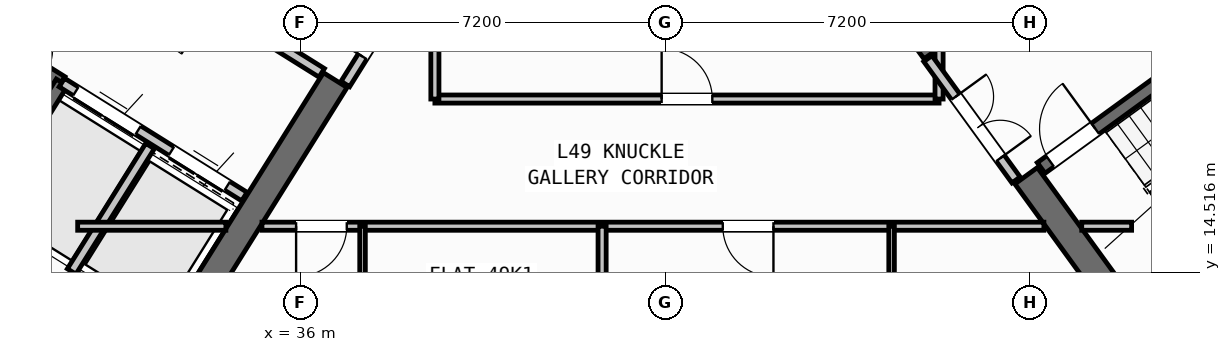
"""IFC4 building model, lengths in metres.
Left out: names, types, materials, properties, quantities, classifications, styles, units other than length and angle.
Written with IfcOpenShell. Run it as: python <this file> out.ifc"""

import sys

from ifc_helpers import new_model, si_unit, direction, frame, frame_2d, origin, place, context, subcontext, project, spatial, rectangle, extrude, source, transform, mapped, element, fill, save


model = new_model("IFC4")
c1 = context("Model", 3, precision=1e-05, world=origin(), true_north=direction((0.0, 1.0)))
c2 = subcontext(c1, "Body", "Model", "MODEL_VIEW")
j1 = project(units=[si_unit("LENGTHUNIT", "METRE"), si_unit("PLANEANGLEUNIT", "RADIAN")], contexts=[c1])
p1 = place(None, origin())
s1 = spatial("IfcSite", under=j1, at=p1, CompositionType="ELEMENT")
p2 = place(p1, origin())
s2 = spatial("IfcBuilding", under=s1, at=p2, CompositionType="ELEMENT")
p3 = place(p2, frame((0.0, 0.0, 195.0)))
s3 = spatial("IfcBuildingStorey", under=s2, at=p3, CompositionType="ELEMENT", Elevation=195.0)
p4 = place(p3, frame((33.366, 12.477, 0.0), z_axis=(0.0, 0.0, 1.0), x_axis=(-0.848047359947, 0.529920442413, 0.0)))
e1 = element("IfcWall", 1, at=p4, inside=s3, PredefinedType="SHEAR", context=c2, shape_type="SweptSolid", body=[
    extrude(rectangle(XDim=13.14, YDim=0.55, at=frame_2d((6.57, 0.0))), origin(), (0.0, 0.0, 1.0), 4.22),
])
p5 = place(p3, frame((36.683, 18.304, 0.0), z_axis=(0.0, 0.0, 1.0), x_axis=(-0.529896466841, -0.848062341122, 0.0)))
e2 = element("IfcWall", 2, at=p5, inside=s3, PredefinedType="SHEAR", context=c2, shape_type="SweptSolid", body=[
    extrude(rectangle(XDim=6.425, YDim=0.55, at=frame_2d((3.212, 0.0))), origin(), (0.0, 0.0, 1.0), 4.22),
])
p6 = place(p3, frame((52.359, 13.14, 0.0), z_axis=(0.0, 0.0, 1.0), x_axis=(0.809014896919, 0.587788139183, 0.0)))
e3 = element("IfcWall", 3, at=p6, inside=s3, PredefinedType="SHEAR", context=c2, shape_type="SweptSolid", body=[
    extrude(rectangle(XDim=12.34, YDim=0.55, at=frame_2d((6.17, 0.0))), origin(), (0.0, 0.0, 1.0), 4.22),
])
p7 = place(p3, frame((52.42, 13.524, 0.0), z_axis=(0.0, 0.0, 1.0), x_axis=(-0.587802113096, 0.809004744015, 0.0)))
e4 = element("IfcWall", 4, at=p7, inside=s3, PredefinedType="SHEAR", context=c2, shape_type="SweptSolid", body=[
    extrude(rectangle(XDim=3.575, YDim=0.55, at=frame_2d((1.788, 0.0))), origin(), (0.0, 0.0, 1.0), 4.22),
])
p8 = place(p3, frame((48.526, 18.884, 0.0), z_axis=(0.0, 0.0, 1.0), x_axis=(-0.587764933797, 0.809031756236, 0.0)))
e5 = element("IfcWall", 5, at=p8, inside=s3, PredefinedType="SHEAR", context=c2, shape_type="SweptSolid", body=[
    extrude(rectangle(XDim=6.425, YDim=0.55, at=frame_2d((3.212, 0.0))), origin(), (0.0, 0.0, 1.0), 4.22),
])
p9 = place(p3, frame((31.76, 12.183, 0.0), z_axis=(0.0, 0.0, 1.0), x_axis=(-0.848047074256, 0.529920899612, 0.0)))
e6 = element("IfcWall", 6, at=p9, inside=s3, PredefinedType="STANDARD", context=c2, shape_type="SweptSolid", body=[
    extrude(rectangle(XDim=30.652, YDim=0.32, at=frame_2d((15.326, 0.0))), origin(), (0.0, 0.0, 1.0), 4.22),
])
p10 = place(p9, frame((15.166, 0.0, 0.0)))
e7 = element("IfcOpeningElement", 7, at=p10, cuts=e6, PredefinedType="OPENING", context=c2, shape_type="SweptSolid", body=[
    extrude(rectangle(XDim=1.2, YDim=2.15, at=frame_2d((0.6, 1.075))), frame((0.0, 0.17, 0.0), z_axis=(0.0, -1.0, 0.0), x_axis=(1.0, 0.0, 0.0)), (0.0, 0.0, 1.0), 0.34),
])
p11 = place(p9, frame((1.765, 0.0, 0.7)))
e8 = element("IfcOpeningElement", 8, at=p11, cuts=e6, PredefinedType="OPENING", context=c2, shape_type="SweptSolid", body=[
    extrude(rectangle(XDim=2.6, YDim=2.0, at=frame_2d((1.3, 1.0))), frame((0.0, 0.17, 0.0), z_axis=(0.0, -1.0, 0.0), x_axis=(1.0, 0.0, 0.0)), (0.0, 0.0, 1.0), 0.34),
])
p12 = place(p9, frame((6.994, 0.0, 0.7)))
e9 = element("IfcOpeningElement", 9, at=p12, cuts=e6, PredefinedType="OPENING", context=c2, shape_type="SweptSolid", body=[
    extrude(rectangle(XDim=2.6, YDim=2.0, at=frame_2d((1.3, 1.0))), frame((0.0, 0.17, 0.0), z_axis=(0.0, -1.0, 0.0), x_axis=(1.0, 0.0, 0.0)), (0.0, 0.0, 1.0), 0.34),
])
p13 = place(p9, frame((19.101, 0.0, 0.85)))
e10 = element("IfcOpeningElement", 10, at=p13, cuts=e6, PredefinedType="OPENING", context=c2, shape_type="SweptSolid", body=[
    extrude(rectangle(XDim=1.6, YDim=1.8, at=frame_2d((0.8, 0.9))), frame((0.0, 0.17, 0.0), z_axis=(0.0, -1.0, 0.0), x_axis=(1.0, 0.0, 0.0)), (0.0, 0.0, 1.0), 0.34),
])
p14 = place(p9, frame((26.358, 0.0, 0.7)))
e11 = element("IfcOpeningElement", 11, at=p14, cuts=e6, PredefinedType="OPENING", context=c2, shape_type="SweptSolid", body=[
    extrude(rectangle(XDim=2.6, YDim=2.0, at=frame_2d((1.3, 1.0))), frame((0.0, 0.17, 0.0), z_axis=(0.0, -1.0, 0.0), x_axis=(1.0, 0.0, 0.0)), (0.0, 0.0, 1.0), 0.34),
])
p15 = place(p3, frame((31.28, 18.261, 0.0), z_axis=(0.0, 0.0, 1.0), x_axis=(-0.848051618787, 0.529913626805, 0.0)))
e12 = element("IfcWall", 12, at=p15, inside=s3, PredefinedType="SHEAR", context=c2, shape_type="SweptSolid", body=[
    extrude(rectangle(XDim=7.46, YDim=0.26, at=frame_2d((3.73, 0.0))), origin(), (0.0, 0.0, 1.0), 4.22),
])
p16 = place(p15, frame((0.36, 0.0, 0.0)))
e13 = element("IfcOpeningElement", 13, at=p16, cuts=e12, PredefinedType="OPENING", context=c2, shape_type="SweptSolid", body=[
    extrude(rectangle(XDim=0.86, YDim=2.05, at=frame_2d((0.43, 1.025))), frame((0.0, 0.14, 0.0), z_axis=(0.0, -1.0, 0.0), x_axis=(1.0, 0.0, 0.0)), (0.0, 0.0, 1.0), 0.28),
])
p17 = place(p3, frame((31.288, 18.256, 0.0), z_axis=(0.0, 0.0, 1.0), x_axis=(-0.529943379326, -0.848033026897, 0.0)))
e14 = element("IfcWall", 14, at=p17, inside=s3, PredefinedType="SHEAR", context=c2, shape_type="SweptSolid", body=[
    extrude(rectangle(XDim=3.16, YDim=0.26, at=frame_2d((1.58, 0.0))), origin(), (0.0, 0.0, 1.0), 4.22),
])
p18 = place(p3, frame((34.891, 16.005, 0.0), z_axis=(0.0, 0.0, 1.0), x_axis=(-0.848062873452, 0.529895614884, 0.0)))
e15 = element("IfcWall", 15, at=p18, inside=s3, PredefinedType="STANDARD", context=c2, shape_type="SweptSolid", body=[
    extrude(rectangle(XDim=4.248, YDim=0.2, at=frame_2d((2.124, 0.0))), origin(), (0.0, 0.0, 1.0), 4.21),
])
p19 = place(p18, frame((0.398, 0.0, 0.0)))
e16 = element("IfcOpeningElement", 16, at=p19, cuts=e15, PredefinedType="OPENING", context=c2, shape_type="SweptSolid", body=[
    extrude(rectangle(XDim=1.3, YDim=2.2, at=frame_2d((0.65, 1.1))), frame((0.0, 0.11, 0.0), z_axis=(0.0, -1.0, 0.0), x_axis=(1.0, 0.0, 0.0)), (0.0, 0.0, 1.0), 0.22),
])
p20 = place(p18, frame((2.473, 0.0, 0.0)))
e17 = element("IfcOpeningElement", 17, at=p20, cuts=e15, PredefinedType="OPENING", context=c2, shape_type="SweptSolid", body=[
    extrude(rectangle(XDim=1.45, YDim=2.25, at=frame_2d((0.725, 1.125))), frame((0.0, 0.11, 0.0), z_axis=(0.0, -1.0, 0.0), x_axis=(1.0, 0.0, 0.0)), (0.0, 0.0, 1.0), 0.22),
])
p21 = place(p3, frame((36.417, 18.447, 0.0), z_axis=(0.0, 0.0, 1.0), x_axis=(-0.848064879198, 0.529892404805, 0.0)))
e18 = element("IfcWall", 18, at=p21, inside=s3, PredefinedType="STANDARD", context=c2, shape_type="SweptSolid", body=[
    extrude(rectangle(XDim=5.768, YDim=0.2, at=frame_2d((2.884, 0.0))), origin(), (0.0, 0.0, 1.0), 4.21),
])
p22 = place(p21, frame((2.548, 0.0, 0.0)))
e19 = element("IfcOpeningElement", 19, at=p22, cuts=e18, PredefinedType="OPENING", context=c2, shape_type="SweptSolid", body=[
    extrude(rectangle(XDim=1.15, YDim=2.1, at=frame_2d((0.575, 1.05))), frame((0.0, 0.11, 0.0), z_axis=(0.0, -1.0, 0.0), x_axis=(1.0, 0.0, 0.0)), (0.0, 0.0, 1.0), 0.22),
])
p23 = place(p3, frame((33.029, 17.003, 0.0), z_axis=(0.0, 0.0, 1.0), x_axis=(-0.529916267533, -0.848049968695, 0.0)))
e20 = element("IfcWall", 20, at=p23, inside=s3, PredefinedType="STANDARD", context=c2, shape_type="SweptSolid", body=[
    extrude(rectangle(XDim=2.92, YDim=0.2, at=frame_2d((1.46, 0.0))), origin(), (0.0, 0.0, 1.0), 4.21),
])
p24 = place(p3, frame((52.472, 14.013, 0.0), z_axis=(0.0, 0.0, 1.0), x_axis=(0.809028366311, 0.587769599847, 0.0)))
e21 = element("IfcWall", 21, at=p24, inside=s3, PredefinedType="SHEAR", context=c2, shape_type="SweptSolid", body=[
    extrude(rectangle(XDim=7.33, YDim=0.26, at=frame_2d((3.665, 0.0))), origin(), (0.0, 0.0, 1.0), 4.22),
])
p25 = place(p3, frame((50.615, 16.57, 0.0), z_axis=(0.0, 0.0, 1.0), x_axis=(0.809028366311, 0.587769599847, 0.0)))
e22 = element("IfcWall", 22, at=p25, inside=s3, PredefinedType="SHEAR", context=c2, shape_type="SweptSolid", body=[
    extrude(rectangle(XDim=7.33, YDim=0.26, at=frame_2d((3.665, 0.0))), origin(), (0.0, 0.0, 1.0), 4.22),
])
p26 = place(p25, frame((0.22, 0.0, 0.0)))
e23 = element("IfcOpeningElement", 23, at=p26, cuts=e22, PredefinedType="OPENING", context=c2, shape_type="SweptSolid", body=[
    extrude(rectangle(XDim=1.1, YDim=2.1, at=frame_2d((0.55, 1.05))), frame((0.0, 0.14, 0.0), z_axis=(0.0, -1.0, 0.0), x_axis=(1.0, 0.0, 0.0)), (0.0, 0.0, 1.0), 0.28),
])
p27 = place(p3, frame((38.451, 20.737, 0.0), z_axis=(0.0, 0.0, 1.0), x_axis=(-0.529924799939, -0.848044637038, 0.0)))
e24 = element("IfcWall", 24, at=p27, inside=s3, PredefinedType="STANDARD", context=c2, shape_type="SweptSolid", body=[
    extrude(rectangle(XDim=2.96, YDim=0.2, at=frame_2d((1.48, 0.0))), origin(), (0.0, 0.0, 1.0), 4.21),
])
p28 = place(p27, frame((1.46, 0.0, 0.0)))
e25 = element("IfcOpeningElement", 25, at=p28, cuts=e24, PredefinedType="OPENING", context=c2, shape_type="SweptSolid", body=[
    extrude(rectangle(XDim=0.86, YDim=2.05, at=frame_2d((0.43, 1.025))), frame((0.0, 0.11, 0.0), z_axis=(0.0, -1.0, 0.0), x_axis=(1.0, 0.0, 0.0)), (0.0, 0.0, 1.0), 0.22),
])
p29 = place(p3, frame((31.6, 15.42, 0.0), z_axis=(0.0, 0.0, 1.0), x_axis=(1.0, 0.0, 0.0)))
e26 = element("IfcWall", 26, at=p29, inside=s3, PredefinedType="PARTITIONING", context=c2, shape_type="SweptSolid", body=[
    extrude(rectangle(XDim=2.925, YDim=0.16, at=frame_2d((1.462, 0.0))), origin(), (0.0, 0.0, 1.0), 4.21),
])
p30 = place(p3, frame((35.237, 15.42, 0.0), z_axis=(0.0, 0.0, 1.0), x_axis=(1.0, 0.0, 0.0)))
e27 = element("IfcWall", 27, at=p30, inside=s3, PredefinedType="PARTITIONING", context=c2, shape_type="SweptSolid", body=[
    extrude(rectangle(XDim=15.432, YDim=0.16, at=frame_2d((7.716, 0.0))), origin(), (0.0, 0.0, 1.0), 4.21),
])
p31 = place(p30, frame((0.674, 0.0, 0.0)))
e28 = element("IfcOpeningElement", 28, at=p31, cuts=e27, PredefinedType="OPENING", context=c2, shape_type="SweptSolid", body=[
    extrude(rectangle(XDim=1.0, YDim=2.1, at=frame_2d((0.5, 1.05))), frame((0.0, 0.09, 0.0), z_axis=(0.0, -1.0, 0.0), x_axis=(1.0, 0.0, 0.0)), (0.0, 0.0, 1.0), 0.18),
])
p32 = place(p30, frame((9.094, 0.0, 0.0)))
e29 = element("IfcOpeningElement", 29, at=p32, cuts=e27, PredefinedType="OPENING", context=c2, shape_type="SweptSolid", body=[
    extrude(rectangle(XDim=1.0, YDim=2.1, at=frame_2d((0.5, 1.05))), frame((0.0, 0.09, 0.0), z_axis=(0.0, -1.0, 0.0), x_axis=(1.0, 0.0, 0.0)), (0.0, 0.0, 1.0), 0.18),
])
p33 = place(p3, frame((51.416, 15.42, 0.0), z_axis=(0.0, 0.0, 1.0), x_axis=(1.0, 0.0, 0.0)))
e30 = element("IfcWall", 30, at=p33, inside=s3, PredefinedType="PARTITIONING", context=c2, shape_type="SweptSolid", body=[
    extrude(rectangle(XDim=0.984, YDim=0.16, at=frame_2d((0.492, 0.0))), origin(), (0.0, 0.0, 1.0), 4.21),
])
p34 = place(p3, frame((38.65, 17.93, 0.0), z_axis=(0.0, 0.0, 1.0), x_axis=(1.0, 0.0, 0.0)))
e31 = element("IfcWall", 31, at=p34, inside=s3, PredefinedType="PARTITIONING", context=c2, shape_type="SweptSolid", body=[
    extrude(rectangle(XDim=9.95, YDim=0.16, at=frame_2d((4.975, 0.0))), origin(), (0.0, 0.0, 1.0), 4.21),
])
p35 = place(p34, frame((4.475, 0.0, 0.0)))
e32 = element("IfcOpeningElement", 32, at=p35, cuts=e31, PredefinedType="OPENING", context=c2, shape_type="SweptSolid", body=[
    extrude(rectangle(XDim=1.0, YDim=2.1, at=frame_2d((0.5, 1.05))), frame((0.0, 0.09, 0.0), z_axis=(0.0, -1.0, 0.0), x_axis=(1.0, 0.0, 0.0)), (0.0, 0.0, 1.0), 0.18),
])
p36 = place(p3, frame((38.65, 17.93, 0.0), z_axis=(0.0, 0.0, 1.0), x_axis=(0.0, 1.0, 0.0)))
e33 = element("IfcWall", 33, at=p36, inside=s3, PredefinedType="PARTITIONING", context=c2, shape_type="SweptSolid", body=[
    extrude(rectangle(XDim=2.951, YDim=0.16, at=frame_2d((1.476, 0.0))), origin(), (0.0, 0.0, 1.0), 4.21),
])
p37 = place(p3, frame((48.6, 17.93, 0.0), z_axis=(0.0, 0.0, 1.0), x_axis=(0.0, 1.0, 0.0)))
e34 = element("IfcWall", 34, at=p37, inside=s3, PredefinedType="PARTITIONING", context=c2, shape_type="SweptSolid", body=[
    extrude(rectangle(XDim=0.993, YDim=0.16, at=frame_2d((0.496, 0.0))), origin(), (0.0, 0.0, 1.0), 4.21),
])
p38 = place(p3, frame((50.119, 16.333, 0.0), z_axis=(0.0, 0.0, 1.0), x_axis=(-0.587749856981, 0.809042709391, 0.0)))
e35 = element("IfcWall", 35, at=p38, inside=s3, PredefinedType="STANDARD", context=c2, shape_type="SweptSolid", body=[
    extrude(rectangle(XDim=2.96, YDim=0.2, at=frame_2d((1.48, 0.0))), origin(), (0.0, 0.0, 1.0), 4.21),
])
p39 = place(p38, frame((0.53, 0.0, 0.0)))
e36 = element("IfcOpeningElement", 36, at=p39, cuts=e35, PredefinedType="OPENING", context=c2, shape_type="SweptSolid", body=[
    extrude(rectangle(XDim=1.5, YDim=2.15, at=frame_2d((0.75, 1.075))), frame((0.0, 0.11, 0.0), z_axis=(0.0, -1.0, 0.0), x_axis=(1.0, 0.0, 0.0)), (0.0, 0.0, 1.0), 0.22),
])
p40 = place(p3, frame((41.95, 1.96, 0.0), z_axis=(0.0, 0.0, 1.0), x_axis=(0.0, 1.0, 0.0)))
e37 = element("IfcWall", 37, at=p40, inside=s3, PredefinedType="PARTITIONING", context=c2, shape_type="SweptSolid", body=[
    extrude(rectangle(XDim=13.46, YDim=0.16, at=frame_2d((6.73, 0.0))), origin(), (0.0, 0.0, 1.0), 4.21),
])
p41 = place(p3, frame((37.222, 1.96, 0.0), z_axis=(0.0, 0.0, 1.0), x_axis=(0.0, 1.0, 0.0)))
e38 = element("IfcWall", 38, at=p41, inside=s3, PredefinedType="PARTITIONING", context=c2, shape_type="SweptSolid", body=[
    extrude(rectangle(XDim=13.46, YDim=0.11, at=frame_2d((6.73, 0.0))), origin(), (0.0, 0.0, 1.0), 4.21),
])
p42 = place(p41, frame((5.2, 0.0, 0.0)))
e39 = element("IfcOpeningElement", 39, at=p42, cuts=e38, PredefinedType="OPENING", context=c2, shape_type="SweptSolid", body=[
    extrude(rectangle(XDim=0.92, YDim=2.08, at=frame_2d((0.46, 1.04))), frame((0.0, 0.065, 0.0), z_axis=(0.0, -1.0, 0.0), x_axis=(1.0, 0.0, 0.0)), (0.0, 0.0, 1.0), 0.13),
])
p43 = place(p41, frame((10.67, 0.0, 0.0)))
e40 = element("IfcOpeningElement", 40, at=p43, cuts=e38, PredefinedType="OPENING", context=c2, shape_type="SweptSolid", body=[
    extrude(rectangle(XDim=0.88, YDim=2.08, at=frame_2d((0.44, 1.04))), frame((0.0, 0.065, 0.0), z_axis=(0.0, -1.0, 0.0), x_axis=(1.0, 0.0, 0.0)), (0.0, 0.0, 1.0), 0.13),
])
p44 = place(p3, frame((47.663, 1.96, 0.0), z_axis=(0.0, 0.0, 1.0), x_axis=(0.0, 1.0, 0.0)))
e41 = element("IfcWall", 41, at=p44, inside=s3, PredefinedType="PARTITIONING", context=c2, shape_type="SweptSolid", body=[
    extrude(rectangle(XDim=13.46, YDim=0.11, at=frame_2d((6.73, 0.0))), origin(), (0.0, 0.0, 1.0), 4.21),
])
p45 = place(p44, frame((6.3, 0.0, 0.0)))
e42 = element("IfcOpeningElement", 42, at=p45, cuts=e41, PredefinedType="OPENING", context=c2, shape_type="SweptSolid", body=[
    extrude(rectangle(XDim=0.92, YDim=2.08, at=frame_2d((0.46, 1.04))), frame((0.0, 0.065, 0.0), z_axis=(0.0, -1.0, 0.0), x_axis=(1.0, 0.0, 0.0)), (0.0, 0.0, 1.0), 0.13),
])
p46 = place(p44, frame((11.32, 0.0, 0.0)))
e43 = element("IfcOpeningElement", 43, at=p46, cuts=e41, PredefinedType="OPENING", context=c2, shape_type="SweptSolid", body=[
    extrude(rectangle(XDim=0.88, YDim=2.08, at=frame_2d((0.44, 1.04))), frame((0.0, 0.065, 0.0), z_axis=(0.0, -1.0, 0.0), x_axis=(1.0, 0.0, 0.0)), (0.0, 0.0, 1.0), 0.13),
])
m1 = source(origin(), c2, "Body", "SweptSolid", [
    extrude(rectangle(XDim=1.3, YDim=2.2, at=frame_2d((0.65, 1.1))), frame((0.0, 0.025, 0.0), z_axis=(0.0, -1.0, 0.0), x_axis=(1.0, 0.0, 0.0)), (0.0, 0.0, 1.0), 0.05),
])
p47 = place(p19, origin())
e44 = element("IfcDoor", 44, at=p47, inside=s3, OperationType="DOUBLE_DOOR_SLIDING", PredefinedType="DOOR", context=c2, shape_type="MappedRepresentation", body=[
    mapped(m1, transform((0.0, 0.0, 0.0), scale=1.0)),
])
fill(e16, e44)
m2 = source(origin(), c2, "Body", "SweptSolid", [
    extrude(rectangle(XDim=1.45, YDim=2.25, at=frame_2d((0.725, 1.125))), frame((0.0, 0.025, 0.0), z_axis=(0.0, -1.0, 0.0), x_axis=(1.0, 0.0, 0.0)), (0.0, 0.0, 1.0), 0.05),
])
p48 = place(p20, origin())
e45 = element("IfcDoor", 45, at=p48, inside=s3, OperationType="DOUBLE_DOOR_SLIDING", PredefinedType="DOOR", context=c2, shape_type="MappedRepresentation", body=[
    mapped(m2, transform((0.0, 0.0, 0.0), scale=1.0)),
])
fill(e17, e45)
m3 = source(origin(), c2, "Body", "SweptSolid", [
    extrude(rectangle(XDim=1.1, YDim=2.1, at=frame_2d((0.55, 1.05))), frame((0.0, 0.025, 0.0), z_axis=(0.0, -1.0, 0.0), x_axis=(1.0, 0.0, 0.0)), (0.0, 0.0, 1.0), 0.05),
])
p49 = place(p26, origin())
e46 = element("IfcDoor", 46, at=p49, inside=s3, OperationType="SINGLE_SWING_RIGHT", PredefinedType="DOOR", context=c2, shape_type="MappedRepresentation", body=[
    mapped(m3, transform((0.0, 0.0, 0.0), scale=1.0)),
])
fill(e23, e46)
m4 = source(origin(), c2, "Body", "SweptSolid", [
    extrude(rectangle(XDim=1.0, YDim=2.1, at=frame_2d((0.5, 1.05))), frame((0.0, 0.025, 0.0), z_axis=(0.0, -1.0, 0.0), x_axis=(1.0, 0.0, 0.0)), (0.0, 0.0, 1.0), 0.05),
])
p50 = place(p35, origin())
e47 = element("IfcDoor", 47, at=p50, inside=s3, OperationType="SINGLE_SWING_LEFT", PredefinedType="DOOR", context=c2, shape_type="MappedRepresentation", body=[
    mapped(m4, transform((0.0, 0.0, 0.0), scale=1.0)),
])
fill(e32, e47)
m5 = source(origin(), c2, "Body", "SweptSolid", [
    extrude(rectangle(XDim=0.86, YDim=2.05, at=frame_2d((0.43, 1.025))), frame((0.0, 0.025, 0.0), z_axis=(0.0, -1.0, 0.0), x_axis=(1.0, 0.0, 0.0)), (0.0, 0.0, 1.0), 0.05),
])
p51 = place(p28, frame((0.86, 0.0, 0.0), z_axis=(0.0, 0.0, 1.0), x_axis=(-1.0, 0.0, 0.0)))
e48 = element("IfcDoor", 48, at=p51, inside=s3, OperationType="SINGLE_SWING_LEFT", PredefinedType="DOOR", context=c2, shape_type="MappedRepresentation", body=[
    mapped(m5, transform((0.0, 0.0, 0.0), scale=1.0)),
])
fill(e25, e48)
m6 = source(origin(), c2, "Body", "SweptSolid", [
    extrude(rectangle(XDim=1.5, YDim=2.15, at=frame_2d((0.75, 1.075))), frame((0.0, 0.025, 0.0), z_axis=(0.0, -1.0, 0.0), x_axis=(1.0, 0.0, 0.0)), (0.0, 0.0, 1.0), 0.05),
])
p52 = place(p39, frame((1.5, 0.0, 0.0), z_axis=(0.0, 0.0, 1.0), x_axis=(-1.0, 0.0, 0.0)))
e49 = element("IfcDoor", 49, at=p52, inside=s3, OperationType="DOUBLE_DOOR_SINGLE_SWING", PredefinedType="DOOR", context=c2, shape_type="MappedRepresentation", body=[
    mapped(m6, transform((0.0, 0.0, 0.0), scale=1.0)),
])
fill(e36, e49)
p53 = place(p31, frame((1.0, 0.0, 0.0), z_axis=(0.0, 0.0, 1.0), x_axis=(-1.0, 0.0, 0.0)))
e50 = element("IfcDoor", 50, at=p53, inside=s3, OperationType="SINGLE_SWING_RIGHT", PredefinedType="DOOR", context=c2, shape_type="MappedRepresentation", body=[
    mapped(m4, transform((0.0, 0.0, 0.0), scale=1.0)),
])
fill(e28, e50)
p54 = place(p32, frame((1.0, 0.0, 0.0), z_axis=(0.0, 0.0, 1.0), x_axis=(-1.0, 0.0, 0.0)))
e51 = element("IfcDoor", 51, at=p54, inside=s3, OperationType="SINGLE_SWING_LEFT", PredefinedType="DOOR", context=c2, shape_type="MappedRepresentation", body=[
    mapped(m4, transform((0.0, 0.0, 0.0), scale=1.0)),
])
fill(e29, e51)
save(model, sys.argv[1])
